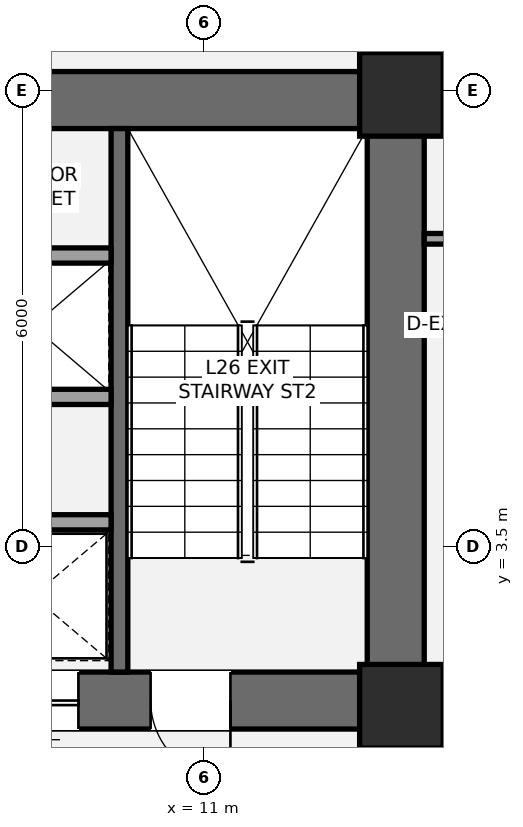
"""IFC4 building model, lengths in metres.
Left out: names, types, materials, properties, quantities, classifications, styles, units other than length and angle.
Written with IfcOpenShell. Run it as: python <this file> out.ifc"""

import sys

from ifc_helpers import new_model, si_unit, direction, frame, frame_2d, origin, origin_2d, place, context, subcontext, project, spatial, rectangle, extrude, element, fill, save


model = new_model("IFC4")
c1 = context("Model", 3, precision=1e-05, world=origin(), true_north=direction((0.0, 1.0)))
c2 = subcontext(c1, "Body", "Model", "MODEL_VIEW")
j1 = project(units=[si_unit("LENGTHUNIT", "METRE"), si_unit("PLANEANGLEUNIT", "RADIAN")], contexts=[c1])
p1 = place(None, origin())
s1 = spatial("IfcSite", under=j1, at=p1, CompositionType="ELEMENT")
p2 = place(p1, origin())
s2 = spatial("IfcBuilding", under=s1, at=p2, CompositionType="ELEMENT")
p3 = place(p2, frame((0.0, 0.0, 100.1)))
s3 = spatial("IfcBuildingStorey", under=s2, at=p3, CompositionType="ELEMENT", Elevation=100.1)
p4 = place(p3, frame((13.525, 1.1, 0.0), z_axis=(0.0, 0.0, 1.0), x_axis=(0.0, 1.0, 0.0)))
e1 = element("IfcWall", 1, at=p4, inside=s3, PredefinedType="SHEAR", context=c2, shape_type="SweptSolid", body=[
    extrude(rectangle(XDim=8.65, YDim=0.75, at=frame_2d((4.325, 0.0))), origin(), (0.0, 0.0, 1.0), 3.5),
])
p5 = place(p3, frame((4.425, 9.375, 0.0), z_axis=(0.0, 0.0, 1.0), x_axis=(1.0, 0.0, 0.0)))
e2 = element("IfcWall", 2, at=p5, inside=s3, PredefinedType="SHEAR", context=c2, shape_type="SweptSolid", body=[
    extrude(rectangle(XDim=9.475, YDim=0.75, at=frame_2d((4.737, 0.0))), origin(), (0.0, 0.0, 1.0), 3.5),
])
p6 = place(p3, frame((13.9, 1.475, 0.0), z_axis=(0.0, 0.0, 1.0), x_axis=(-1.0, 0.0, 0.0)))
e3 = element("IfcWall", 3, at=p6, inside=s3, PredefinedType="SHEAR", context=c2, shape_type="SweptSolid", body=[
    extrude(rectangle(XDim=9.075, YDim=0.75, at=frame_2d((4.538, 0.0))), origin(), (0.0, 0.0, 1.0), 3.5),
])
p7 = place(p6, frame((2.55, 0.0, 0.0)))
e4 = element("IfcOpeningElement", 4, at=p7, cuts=e3, PredefinedType="OPENING", context=c2, shape_type="SweptSolid", body=[
    extrude(rectangle(XDim=1.05, YDim=2.15, at=frame_2d((0.525, 1.075))), frame((0.0, 0.385, 0.0), z_axis=(0.0, -1.0, 0.0), x_axis=(1.0, 0.0, 0.0)), (0.0, 0.0, 1.0), 0.77),
])
p8 = place(p6, frame((4.55, 0.0, 0.0)))
e5 = element("IfcOpeningElement", 5, at=p8, cuts=e3, PredefinedType="OPENING", context=c2, shape_type="SweptSolid", body=[
    extrude(rectangle(XDim=1.1, YDim=2.2, at=frame_2d((0.55, 1.1))), frame((0.0, 0.385, 0.0), z_axis=(0.0, -1.0, 0.0), x_axis=(1.0, 0.0, 0.0)), (0.0, 0.0, 1.0), 0.77),
])
p9 = place(p3, frame((9.89, 1.85, 0.0), z_axis=(0.0, 0.0, 1.0), x_axis=(0.0, 1.0, 0.0)))
e6 = element("IfcWall", 6, at=p9, inside=s3, PredefinedType="SHEAR", context=c2, shape_type="SweptSolid", body=[
    extrude(rectangle(XDim=7.15, YDim=0.22, at=frame_2d((3.575, 0.0))), origin(), (0.0, 0.0, 1.0), 3.5),
])
for number, where, z_axis, x_axis in (
    (7, (13.6, 1.4, 0.0), (0.0, 0.0, 1.0), (1.0, 0.0, 0.0)),
    (8, (13.6, 9.45, 0.0), (0.0, 0.0, 1.0), (1.0, 0.0, 0.0)),
):
    element("IfcColumn", number, at=place(p3, frame(where, z_axis=z_axis, x_axis=x_axis)), inside=s3, PredefinedType="COLUMN", context=c2, shape_type="SweptSolid", body=[
        extrude(rectangle(XDim=1.1, YDim=1.1, at=origin_2d()), origin(), (0.0, 0.0, 1.0), 3.5),
    ])
p10 = place(p3, frame((13.45, -2.15, 0.0), z_axis=(0.0, 0.0, 1.0), x_axis=(0.0, 1.0, 0.0)))
e9 = element("IfcWall", 9, at=p10, inside=s3, PredefinedType="PARTITIONING", context=c2, shape_type="SweptSolid", body=[
    extrude(rectangle(XDim=3.3, YDim=0.165, at=frame_2d((1.65, 0.0))), origin(), (0.0, 0.0, 1.0), 2.763),
])
p11 = place(p10, frame((1.15, 0.0, 0.0)))
e10 = element("IfcOpeningElement", 10, at=p11, cuts=e9, PredefinedType="OPENING", context=c2, shape_type="SweptSolid", body=[
    extrude(rectangle(XDim=1.05, YDim=2.15, at=frame_2d((0.525, 1.075))), frame((0.0, 0.093, 0.0), z_axis=(0.0, -1.0, 0.0), x_axis=(1.0, 0.0, 0.0)), (0.0, 0.0, 1.0), 0.185),
])
p12 = place(p3, frame((5.575, 3.82, 0.0), z_axis=(0.0, 0.0, 1.0), x_axis=(1.0, 0.0, 0.0)))
e11 = element("IfcWall", 11, at=p12, inside=s3, PredefinedType="SOLIDWALL", context=c2, shape_type="SweptSolid", body=[
    extrude(rectangle(XDim=4.205, YDim=0.2, at=frame_2d((2.103, 0.0))), origin(), (0.0, 0.0, 1.0), 3.31),
])
p13 = place(p12, frame((0.65, 0.0, 0.0)))
e12 = element("IfcOpeningElement", 12, at=p13, cuts=e11, PredefinedType="OPENING", context=c2, shape_type="SweptSolid", body=[
    extrude(rectangle(XDim=1.2, YDim=2.2, at=frame_2d((0.6, 1.1))), frame((0.0, 0.11, 0.0), z_axis=(0.0, -1.0, 0.0), x_axis=(1.0, 0.0, 0.0)), (0.0, 0.0, 1.0), 0.22),
])
for number, where, z_axis, x_axis in (
    (13, (5.575, 5.47, 0.0), (0.0, 0.0, 1.0), (1.0, 0.0, 0.0)),
    (14, (5.575, 7.33, 0.0), (0.0, 0.0, 1.0), (1.0, 0.0, 0.0)),
):
    element("IfcWall", number, at=place(p3, frame(where, z_axis=z_axis, x_axis=x_axis)), inside=s3, PredefinedType="SOLIDWALL", context=c2, shape_type="SweptSolid", body=[
        extrude(rectangle(XDim=4.205, YDim=0.2, at=frame_2d((2.103, 0.0))), origin(), (0.0, 0.0, 1.0), 3.31),
    ])
p14 = place(p3, frame((13.9, 7.55, 0.0), z_axis=(0.0, 0.0, 1.0), x_axis=(1.0, 0.0, 0.0)))
e15 = element("IfcWall", 15, at=p14, inside=s3, PredefinedType="PARTITIONING", context=c2, shape_type="SweptSolid", body=[
    extrude(rectangle(XDim=1.8, YDim=0.14, at=frame_2d((0.9, 0.0))), origin(), (0.0, 0.0, 1.0), 2.763),
])
p15 = place(p14, frame((0.32, 0.0, 0.0)))
e16 = element("IfcOpeningElement", 16, at=p15, cuts=e15, PredefinedType="OPENING", context=c2, shape_type="SweptSolid", body=[
    extrude(rectangle(XDim=0.92, YDim=2.15, at=frame_2d((0.46, 1.075))), frame((0.0, 0.08, 0.0), z_axis=(0.0, -1.0, 0.0), x_axis=(1.0, 0.0, 0.0)), (0.0, 0.0, 1.0), 0.16),
])
p16 = place(p7, origin())
e17 = element("IfcDoor", 17, at=p16, inside=s3, OperationType="SINGLE_SWING_LEFT", PredefinedType="DOOR", context=c2, shape_type="SweptSolid", body=[
    extrude(rectangle(XDim=1.05, YDim=2.15, at=frame_2d((0.525, 1.075))), frame((0.0, 0.025, 0.0), z_axis=(0.0, -1.0, 0.0), x_axis=(1.0, 0.0, 0.0)), (0.0, 0.0, 1.0), 0.05),
])
fill(e4, e17)
p17 = place(p8, origin())
e18 = element("IfcDoor", 18, at=p17, inside=s3, OperationType="SLIDING_TO_LEFT", PredefinedType="DOOR", context=c2, shape_type="SweptSolid", body=[
    extrude(rectangle(XDim=1.1, YDim=2.2, at=frame_2d((0.55, 1.1))), frame((0.0, 0.025, 0.0), z_axis=(0.0, -1.0, 0.0), x_axis=(1.0, 0.0, 0.0)), (0.0, 0.0, 1.0), 0.05),
])
fill(e5, e18)
save(model, sys.argv[1])
